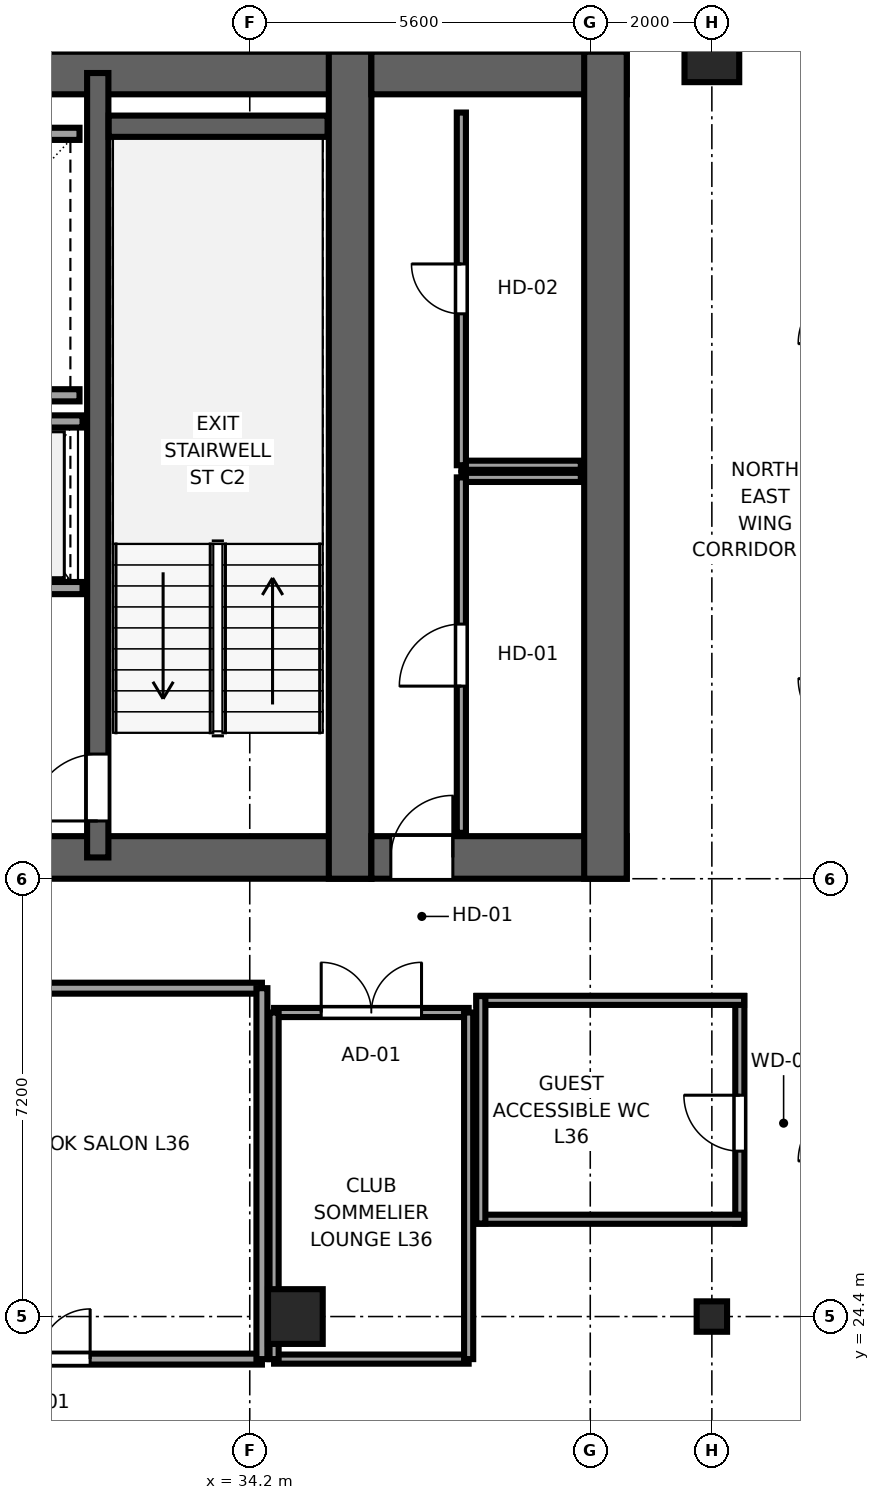
"""IFC4 building model, lengths in metres.
Left out: names, types, materials, properties, quantities, classifications, styles, units other than length and angle.
Written with IfcOpenShell. Run it as: python <this file> out.ifc"""

import sys

from ifc_helpers import new_model, si_unit, direction, frame, frame_2d, origin, origin_2d, place, context, subcontext, project, spatial, rectangle, i_section, extrude, source, transform, mapped, element, fill, save


model = new_model("IFC4")
c1 = context("Model", 3, precision=1e-05, world=origin(), true_north=direction((0.0, 1.0)))
c2 = subcontext(c1, "Body", "Model", "MODEL_VIEW")
j1 = project(units=[si_unit("LENGTHUNIT", "METRE"), si_unit("PLANEANGLEUNIT", "RADIAN")], contexts=[c1])
p1 = place(None, origin())
s1 = spatial("IfcSite", under=j1, at=p1, CompositionType="ELEMENT")
p2 = place(p1, origin())
s2 = spatial("IfcBuilding", under=s1, at=p2, CompositionType="ELEMENT")
p3 = place(p2, frame((0.0, 0.0, 139.95)))
s3 = spatial("IfcBuildingStorey", under=s2, at=p3, CompositionType="ELEMENT", Elevation=139.95)
p4 = place(p3, frame((9.8, 31.95, 0.0), z_axis=(0.0, 0.0, 1.0), x_axis=(1.0, 0.0, 0.0)))
e1 = element("IfcWall", 1, at=p4, inside=s3, PredefinedType="SHEAR", context=c2, shape_type="SweptSolid", body=[
    extrude(rectangle(XDim=26.4, YDim=0.7, at=frame_2d((13.2, 0.0))), origin(), (0.0, 0.0, 1.0), 3.55),
])
p5 = place(p4, frame((7.65, 0.0, 0.0), z_axis=(0.0, 0.0, 1.0), x_axis=(-1.0, 0.0, 0.0)))
e2 = element("IfcOpeningElement", 2, at=p5, cuts=e1, PredefinedType="OPENING", context=c2, shape_type="SweptSolid", body=[
    extrude(rectangle(XDim=1.5, YDim=2.04, at=frame_2d((0.75, 1.02))), frame((0.0, 0.36, 0.0), z_axis=(0.0, -1.0, 0.0), x_axis=(1.0, 0.0, 0.0)), (0.0, 0.0, 1.0), 0.72),
])
p6 = place(p4, frame((13.95, 0.0, 0.0), z_axis=(0.0, 0.0, 1.0), x_axis=(-1.0, 0.0, 0.0)))
e3 = element("IfcOpeningElement", 3, at=p6, cuts=e1, PredefinedType="OPENING", context=c2, shape_type="SweptSolid", body=[
    extrude(rectangle(XDim=1.5, YDim=2.04, at=frame_2d((0.75, 1.02))), frame((0.0, 0.36, 0.0), z_axis=(0.0, -1.0, 0.0), x_axis=(1.0, 0.0, 0.0)), (0.0, 0.0, 1.0), 0.72),
])
p7 = place(p4, frame((20.25, 0.0, 0.0), z_axis=(0.0, 0.0, 1.0), x_axis=(-1.0, 0.0, 0.0)))
e4 = element("IfcOpeningElement", 4, at=p7, cuts=e1, PredefinedType="OPENING", context=c2, shape_type="SweptSolid", body=[
    extrude(rectangle(XDim=1.5, YDim=2.04, at=frame_2d((0.75, 1.02))), frame((0.0, 0.36, 0.0), z_axis=(0.0, -1.0, 0.0), x_axis=(1.0, 0.0, 0.0)), (0.0, 0.0, 1.0), 0.72),
])
p8 = place(p3, frame((9.8, 44.85, 0.0), z_axis=(0.0, 0.0, 1.0), x_axis=(1.0, 0.0, 0.0)))
e5 = element("IfcWall", 5, at=p8, inside=s3, PredefinedType="SHEAR", context=c2, shape_type="SweptSolid", body=[
    extrude(rectangle(XDim=26.4, YDim=0.7, at=frame_2d((13.2, 0.0))), origin(), (0.0, 0.0, 1.0), 3.55),
])
p9 = place(p3, frame((35.85, 31.6, 0.0), z_axis=(0.0, 0.0, 1.0), x_axis=(0.0, 1.0, 0.0)))
e6 = element("IfcWall", 6, at=p9, inside=s3, PredefinedType="SHEAR", context=c2, shape_type="SweptSolid", body=[
    extrude(rectangle(XDim=13.6, YDim=0.7, at=frame_2d((6.8, 0.0))), origin(), (0.0, 0.0, 1.0), 3.55),
])
p10 = place(p3, frame((31.7, 31.95, 0.0), z_axis=(0.0, 0.0, 1.0), x_axis=(0.0, 1.0, 0.0)))
e7 = element("IfcWall", 7, at=p10, inside=s3, PredefinedType="SHEAR", context=c2, shape_type="SweptSolid", body=[
    extrude(rectangle(XDim=12.9, YDim=0.35, at=frame_2d((6.45, 0.0))), origin(), (0.0, 0.0, 1.0), 3.55),
])
p11 = place(p10, frame((1.7, 0.0, 0.0), z_axis=(0.0, 0.0, 1.0), x_axis=(-1.0, 0.0, 0.0)))
e8 = element("IfcOpeningElement", 8, at=p11, cuts=e7, PredefinedType="OPENING", context=c2, shape_type="SweptSolid", body=[
    extrude(rectangle(XDim=1.1, YDim=2.12, at=frame_2d((0.55, 1.06))), frame((0.0, 0.185, 0.0), z_axis=(0.0, -1.0, 0.0), x_axis=(1.0, 0.0, 0.0)), (0.0, 0.0, 1.0), 0.37),
])
p12 = place(p3, frame((36.2, 31.95, 0.0), z_axis=(0.0, 0.0, 1.0), x_axis=(1.0, 0.0, 0.0)))
e9 = element("IfcWall", 9, at=p12, inside=s3, PredefinedType="SHEAR", context=c2, shape_type="SweptSolid", body=[
    extrude(rectangle(XDim=4.2, YDim=0.7, at=frame_2d((2.1, 0.0))), origin(), (0.0, 0.0, 1.0), 3.55),
])
p13 = place(p12, frame((1.34, 0.0, 0.0), z_axis=(0.0, 0.0, 1.0), x_axis=(-1.0, 0.0, 0.0)))
e10 = element("IfcOpeningElement", 10, at=p13, cuts=e9, PredefinedType="OPENING", context=c2, shape_type="SweptSolid", body=[
    extrude(rectangle(XDim=1.02, YDim=2.03, at=frame_2d((0.51, 1.015))), frame((0.0, 0.36, 0.0), z_axis=(0.0, -1.0, 0.0), x_axis=(1.0, 0.0, 0.0)), (0.0, 0.0, 1.0), 0.72),
])
p14 = place(p3, frame((36.2, 44.85, 0.0), z_axis=(0.0, 0.0, 1.0), x_axis=(1.0, 0.0, 0.0)))
e11 = element("IfcWall", 11, at=p14, inside=s3, PredefinedType="SHEAR", context=c2, shape_type="SweptSolid", body=[
    extrude(rectangle(XDim=4.2, YDim=0.7, at=frame_2d((2.1, 0.0))), origin(), (0.0, 0.0, 1.0), 3.55),
])
p15 = place(p3, frame((40.05, 31.6, 0.0), z_axis=(0.0, 0.0, 1.0), x_axis=(0.0, 1.0, 0.0)))
e12 = element("IfcWall", 12, at=p15, inside=s3, PredefinedType="SHEAR", context=c2, shape_type="SweptSolid", body=[
    extrude(rectangle(XDim=13.6, YDim=0.7, at=frame_2d((6.8, 0.0))), origin(), (0.0, 0.0, 1.0), 3.55),
])
p16 = place(p3, frame((31.88, 43.975, 0.0), z_axis=(0.0, 0.0, 1.0), x_axis=(1.0, 0.0, 0.0)))
e13 = element("IfcWall", 13, at=p16, inside=s3, PredefinedType="SHEAR", context=c2, shape_type="SweptSolid", body=[
    extrude(rectangle(XDim=3.6, YDim=0.35, at=frame_2d((1.8, 0.0))), origin(), (0.0, 0.0, 1.0), 3.55),
])
m1 = source(origin(), c2, "Body", "SweptSolid", [
    extrude(rectangle(XDim=0.9, YDim=0.9, at=origin_2d()), origin(), (0.0, 0.0, 1.0), 3.55),
])
p17 = place(p3, frame((34.95, 24.4, 0.0), z_axis=(0.0, 0.0, 1.0), x_axis=(1.0, 0.0, 0.0)))
e14 = element("IfcColumn", 14, at=p17, inside=s3, PredefinedType="COLUMN", context=c2, shape_type="MappedRepresentation", body=[
    mapped(m1, transform((0.0, 0.0, 0.0), x_axis=(1.0, 0.0, 0.0), y_axis=(0.0, 1.0, 0.0), z_axis=(0.0, 0.0, 1.0), scale=1.0)),
])
m2 = source(origin(), c2, "Body", "SweptSolid", [
    extrude(i_section(OverallWidth=0.5, OverallDepth=0.5, WebThickness=0.022, FlangeThickness=0.034, at=origin_2d()), origin(), (0.0, 0.0, 1.0), 3.55),
])
p18 = place(p3, frame((41.8, 24.4, 0.0), z_axis=(0.0, 0.0, 1.0), x_axis=(1.0, 0.0, 0.0)))
e15 = element("IfcColumn", 15, at=p18, inside=s3, PredefinedType="COLUMN", context=c2, shape_type="MappedRepresentation", body=[
    mapped(m2, transform((0.0, 0.0, 0.0), x_axis=(1.0, 0.0, 0.0), y_axis=(0.0, 1.0, 0.0), z_axis=(0.0, 0.0, 1.0), scale=1.0)),
])
p19 = place(p3, frame((41.8, 45.15, 0.0), z_axis=(0.0, 0.0, 1.0), x_axis=(1.0, 0.0, 0.0)))
e16 = element("IfcColumn", 16, at=p19, inside=s3, PredefinedType="COLUMN", context=c2, shape_type="MappedRepresentation", body=[
    mapped(m1, transform((0.0, 0.0, 0.0), x_axis=(1.0, 0.0, 0.0), y_axis=(0.0, 1.0, 0.0), z_axis=(0.0, 0.0, 1.0), scale=1.0)),
])
for number, where, z_axis, x_axis in (
    (17, (27.3, 39.55, 0.0), (0.0, 0.0, 1.0), (1.0, 0.0, 0.0)),
    (18, (27.3, 43.85, 0.0), (0.0, 0.0, 1.0), (1.0, 0.0, 0.0)),
):
    element("IfcWall", number, at=place(p3, frame(where, z_axis=z_axis, x_axis=x_axis)), inside=s3, PredefinedType="SOLIDWALL", context=c2, shape_type="SweptSolid", body=[
        extrude(rectangle(XDim=4.1, YDim=0.2, at=frame_2d((2.05, 0.0))), origin(), (0.0, 0.0, 1.0), 3.37),
    ])
p20 = place(p3, frame((27.375, 36.38, 0.0), z_axis=(0.0, 0.0, 1.0), x_axis=(1.0, 0.0, 0.0)))
e19 = element("IfcWall", 19, at=p20, inside=s3, PredefinedType="SOLIDWALL", context=c2, shape_type="SweptSolid", body=[
    extrude(rectangle(XDim=4.075, YDim=0.2, at=frame_2d((2.038, 0.0))), origin(), (0.0, 0.0, 1.0), 3.37),
])
p21 = place(p20, frame((0.525, 0.0, 0.0)))
e20 = element("IfcOpeningElement", 20, at=p21, cuts=e19, PredefinedType="OPENING", context=c2, shape_type="SweptSolid", body=[
    extrude(rectangle(XDim=1.1, YDim=2.12, at=frame_2d((0.55, 1.06))), frame((0.0, 0.11, 0.0), z_axis=(0.0, -1.0, 0.0), x_axis=(1.0, 0.0, 0.0)), (0.0, 0.0, 1.0), 0.22),
])
p22 = place(p20, frame((2.425, 0.0, 0.0)))
e21 = element("IfcOpeningElement", 21, at=p22, cuts=e19, PredefinedType="OPENING", context=c2, shape_type="SweptSolid", body=[
    extrude(rectangle(XDim=1.1, YDim=2.12, at=frame_2d((0.55, 1.06))), frame((0.0, 0.11, 0.0), z_axis=(0.0, -1.0, 0.0), x_axis=(1.0, 0.0, 0.0)), (0.0, 0.0, 1.0), 0.22),
])
p23 = place(p3, frame((27.375, 39.12, 0.0), z_axis=(0.0, 0.0, 1.0), x_axis=(1.0, 0.0, 0.0)))
e22 = element("IfcWall", 22, at=p23, inside=s3, PredefinedType="SOLIDWALL", context=c2, shape_type="SweptSolid", body=[
    extrude(rectangle(XDim=4.075, YDim=0.2, at=frame_2d((2.038, 0.0))), origin(), (0.0, 0.0, 1.0), 3.37),
])
p24 = place(p3, frame((37.68, 38.2, 0.0), z_axis=(0.0, 0.0, 1.0), x_axis=(1.0, 0.0, 0.0)))
e23 = element("IfcWall", 23, at=p24, inside=s3, PredefinedType="PARTITIONING", context=c2, shape_type="SweptSolid", body=[
    extrude(rectangle(XDim=1.965, YDim=0.15, at=frame_2d((0.982, 0.0))), origin(), (0.0, 0.0, 1.0), 3.37),
])
p25 = place(p3, frame((37.68, 32.355, 0.0), z_axis=(0.0, 0.0, 1.0), x_axis=(0.0, 1.0, 0.0)))
e24 = element("IfcWall", 24, at=p25, inside=s3, PredefinedType="PARTITIONING", context=c2, shape_type="SweptSolid", body=[
    extrude(rectangle(XDim=5.845, YDim=0.15, at=frame_2d((2.922, 0.0))), origin(), (0.0, 0.0, 1.0), 3.37),
])
p26 = place(p25, frame((2.413, 0.0, 0.0)))
e25 = element("IfcOpeningElement", 25, at=p26, cuts=e24, PredefinedType="OPENING", context=c2, shape_type="SweptSolid", body=[
    extrude(rectangle(XDim=1.02, YDim=2.03, at=frame_2d((0.51, 1.015))), frame((0.0, 0.085, 0.0), z_axis=(0.0, -1.0, 0.0), x_axis=(1.0, 0.0, 0.0)), (0.0, 0.0, 1.0), 0.17),
])
p27 = place(p3, frame((37.68, 38.4, 0.0), z_axis=(0.0, 0.0, 1.0), x_axis=(1.0, 0.0, 0.0)))
e26 = element("IfcWall", 26, at=p27, inside=s3, PredefinedType="PARTITIONING", context=c2, shape_type="SweptSolid", body=[
    extrude(rectangle(XDim=1.965, YDim=0.15, at=frame_2d((0.982, 0.0))), origin(), (0.0, 0.0, 1.0), 3.37),
])
p28 = place(p3, frame((37.68, 38.4, 0.0), z_axis=(0.0, 0.0, 1.0), x_axis=(0.0, 1.0, 0.0)))
e27 = element("IfcWall", 27, at=p28, inside=s3, PredefinedType="PARTITIONING", context=c2, shape_type="SweptSolid", body=[
    extrude(rectangle(XDim=5.8, YDim=0.15, at=frame_2d((2.9, 0.0))), origin(), (0.0, 0.0, 1.0), 3.37),
])
p29 = place(p28, frame((2.49, 0.0, 0.0)))
e28 = element("IfcOpeningElement", 28, at=p29, cuts=e27, PredefinedType="OPENING", context=c2, shape_type="SweptSolid", body=[
    extrude(rectangle(XDim=0.82, YDim=2.01, at=frame_2d((0.41, 1.005))), frame((0.0, 0.085, 0.0), z_axis=(0.0, -1.0, 0.0), x_axis=(1.0, 0.0, 0.0)), (0.0, 0.0, 1.0), 0.17),
])
p30 = place(p3, frame((42.26, 25.93, 0.0), z_axis=(0.0, 0.0, 1.0), x_axis=(0.0, 1.0, 0.0)))
e29 = element("IfcWall", 29, at=p30, inside=s3, PredefinedType="PARTITIONING", context=c2, shape_type="SweptSolid", body=[
    extrude(rectangle(XDim=3.74, YDim=0.15, at=frame_2d((1.87, 0.0))), origin(), (0.0, 0.0, 1.0), 3.37),
])
p31 = place(p30, frame((1.19, 0.0, 0.0)))
e30 = element("IfcOpeningElement", 30, at=p31, cuts=e29, PredefinedType="OPENING", context=c2, shape_type="SweptSolid", body=[
    extrude(rectangle(XDim=0.92, YDim=2.01, at=frame_2d((0.46, 1.005))), frame((0.0, 0.085, 0.0), z_axis=(0.0, -1.0, 0.0), x_axis=(1.0, 0.0, 0.0)), (0.0, 0.0, 1.0), 0.17),
])
for number, where, z_axis, x_axis in (
    (31, (37.93, 26.0, 0.0), (0.0, 0.0, 1.0), (1.0, 0.0, 0.0)),
    (32, (37.93, 29.6, 0.0), (0.0, 0.0, 1.0), (1.0, 0.0, 0.0)),
):
    element("IfcWall", number, at=place(p3, frame(where, z_axis=z_axis, x_axis=x_axis)), inside=s3, PredefinedType="PARTITIONING", context=c2, shape_type="SweptSolid", body=[
        extrude(rectangle(XDim=4.4, YDim=0.15, at=frame_2d((2.2, 0.0))), origin(), (0.0, 0.0, 1.0), 3.37),
    ])
p32 = place(p3, frame((38.0, 25.93, 0.0), z_axis=(0.0, 0.0, 1.0), x_axis=(0.0, 1.0, 0.0)))
e33 = element("IfcWall", 33, at=p32, inside=s3, PredefinedType="PARTITIONING", context=c2, shape_type="SweptSolid", body=[
    extrude(rectangle(XDim=3.74, YDim=0.15, at=frame_2d((1.87, 0.0))), origin(), (0.0, 0.0, 1.0), 3.37),
])
p33 = place(p3, frame((27.1, 23.7, 0.0), z_axis=(0.0, 0.0, 1.0), x_axis=(1.0, 0.0, 0.0)))
e34 = element("IfcWall", 34, at=p33, inside=s3, PredefinedType="PARTITIONING", context=c2, shape_type="SweptSolid", body=[
    extrude(rectangle(XDim=7.3, YDim=0.18, at=frame_2d((3.65, 0.0))), origin(), (0.0, 0.0, 1.0), 3.37),
])
p34 = place(p33, frame((2.825, 0.0, 0.0)))
e35 = element("IfcOpeningElement", 35, at=p34, cuts=e34, PredefinedType="OPENING", context=c2, shape_type="SweptSolid", body=[
    extrude(rectangle(XDim=1.65, YDim=2.15, at=frame_2d((0.825, 1.075))), frame((0.0, 0.1, 0.0), z_axis=(0.0, -1.0, 0.0), x_axis=(1.0, 0.0, 0.0)), (0.0, 0.0, 1.0), 0.2),
])
p35 = place(p3, frame((27.1, 29.8, 0.0), z_axis=(0.0, 0.0, 1.0), x_axis=(1.0, 0.0, 0.0)))
e36 = element("IfcWall", 36, at=p35, inside=s3, PredefinedType="PARTITIONING", context=c2, shape_type="SweptSolid", body=[
    extrude(rectangle(XDim=7.3, YDim=0.18, at=frame_2d((3.65, 0.0))), origin(), (0.0, 0.0, 1.0), 3.37),
])
p36 = place(p3, frame((34.4, 23.7, 0.0), z_axis=(0.0, 0.0, 1.0), x_axis=(0.0, 1.0, 0.0)))
e37 = element("IfcWall", 37, at=p36, inside=s3, PredefinedType="PARTITIONING", context=c2, shape_type="SweptSolid", body=[
    extrude(rectangle(XDim=6.1, YDim=0.18, at=frame_2d((3.05, 0.0))), origin(), (0.0, 0.0, 1.0), 3.37),
])
p37 = place(p3, frame((34.6, 23.7, 0.0), z_axis=(0.0, 0.0, 1.0), x_axis=(1.0, 0.0, 0.0)))
e38 = element("IfcWall", 38, at=p37, inside=s3, PredefinedType="PARTITIONING", context=c2, shape_type="SweptSolid", body=[
    extrude(rectangle(XDim=3.2, YDim=0.15, at=frame_2d((1.6, 0.0))), origin(), (0.0, 0.0, 1.0), 3.37),
])
p38 = place(p3, frame((34.6, 29.4, 0.0), z_axis=(0.0, 0.0, 1.0), x_axis=(1.0, 0.0, 0.0)))
e39 = element("IfcWall", 39, at=p38, inside=s3, PredefinedType="PARTITIONING", context=c2, shape_type="SweptSolid", body=[
    extrude(rectangle(XDim=3.2, YDim=0.15, at=frame_2d((1.6, 0.0))), origin(), (0.0, 0.0, 1.0), 3.37),
])
p39 = place(p38, frame((0.775, 0.0, 0.0)))
e40 = element("IfcOpeningElement", 40, at=p39, cuts=e39, PredefinedType="OPENING", context=c2, shape_type="SweptSolid", body=[
    extrude(rectangle(XDim=1.65, YDim=2.15, at=frame_2d((0.825, 1.075))), frame((0.0, 0.085, 0.0), z_axis=(0.0, -1.0, 0.0), x_axis=(1.0, 0.0, 0.0)), (0.0, 0.0, 1.0), 0.17),
])
for number, where, z_axis, x_axis in (
    (41, (34.6, 23.7, 0.0), (0.0, 0.0, 1.0), (0.0, 1.0, 0.0)),
    (42, (37.8, 23.7, 0.0), (0.0, 0.0, 1.0), (0.0, 1.0, 0.0)),
):
    element("IfcWall", number, at=place(p3, frame(where, z_axis=z_axis, x_axis=x_axis)), inside=s3, PredefinedType="PARTITIONING", context=c2, shape_type="SweptSolid", body=[
        extrude(rectangle(XDim=5.7, YDim=0.15, at=frame_2d((2.85, 0.0))), origin(), (0.0, 0.0, 1.0), 3.37),
    ])
m3 = source(origin(), c2, "Body", "SweptSolid", [
    extrude(rectangle(XDim=1.1, YDim=2.12, at=frame_2d((0.55, 1.06))), frame((0.0, 0.025, 0.0), z_axis=(0.0, -1.0, 0.0), x_axis=(1.0, 0.0, 0.0)), (0.0, 0.0, 1.0), 0.05),
])
p40 = place(p11, origin())
e43 = element("IfcDoor", 43, at=p40, inside=s3, OperationType="SINGLE_SWING_LEFT", PredefinedType="DOOR", context=c2, shape_type="MappedRepresentation", body=[
    mapped(m3, transform((0.0, 0.0, 0.0), x_axis=(1.0, 0.0, 0.0), y_axis=(0.0, 1.0, 0.0), z_axis=(0.0, 0.0, 1.0), scale=1.0)),
])
fill(e8, e43)
m4 = source(origin(), c2, "Body", "SweptSolid", [
    extrude(rectangle(XDim=1.02, YDim=2.03, at=frame_2d((0.51, 1.015))), frame((0.0, 0.025, 0.0), z_axis=(0.0, -1.0, 0.0), x_axis=(1.0, 0.0, 0.0)), (0.0, 0.0, 1.0), 0.05),
])
p41 = place(p13, origin())
e44 = element("IfcDoor", 44, at=p41, inside=s3, OperationType="SINGLE_SWING_RIGHT", PredefinedType="DOOR", context=c2, shape_type="MappedRepresentation", body=[
    mapped(m4, transform((0.0, 0.0, 0.0), x_axis=(1.0, 0.0, 0.0), y_axis=(0.0, 1.0, 0.0), z_axis=(0.0, 0.0, 1.0), scale=1.0)),
])
fill(e10, e44)
p42 = place(p26, origin())
e45 = element("IfcDoor", 45, at=p42, inside=s3, OperationType="SINGLE_SWING_LEFT", PredefinedType="DOOR", context=c2, shape_type="MappedRepresentation", body=[
    mapped(m4, transform((0.0, 0.0, 0.0), x_axis=(1.0, 0.0, 0.0), y_axis=(0.0, 1.0, 0.0), z_axis=(0.0, 0.0, 1.0), scale=1.0)),
])
fill(e25, e45)
m5 = source(origin(), c2, "Body", "SweptSolid", [
    extrude(rectangle(XDim=0.82, YDim=2.01, at=frame_2d((0.41, 1.005))), frame((0.0, 0.025, 0.0), z_axis=(0.0, -1.0, 0.0), x_axis=(1.0, 0.0, 0.0)), (0.0, 0.0, 1.0), 0.05),
])
p43 = place(p29, origin())
e46 = element("IfcDoor", 46, at=p43, inside=s3, OperationType="SINGLE_SWING_RIGHT", PredefinedType="DOOR", context=c2, shape_type="MappedRepresentation", body=[
    mapped(m5, transform((0.0, 0.0, 0.0), x_axis=(1.0, 0.0, 0.0), y_axis=(0.0, 1.0, 0.0), z_axis=(0.0, 0.0, 1.0), scale=1.0)),
])
fill(e28, e46)
m6 = source(origin(), c2, "Body", "SweptSolid", [
    extrude(rectangle(XDim=0.92, YDim=2.01, at=frame_2d((0.46, 1.005))), frame((0.0, 0.025, 0.0), z_axis=(0.0, -1.0, 0.0), x_axis=(1.0, 0.0, 0.0)), (0.0, 0.0, 1.0), 0.05),
])
p44 = place(p31, origin())
e47 = element("IfcDoor", 47, at=p44, inside=s3, OperationType="SINGLE_SWING_RIGHT", PredefinedType="DOOR", context=c2, shape_type="MappedRepresentation", body=[
    mapped(m6, transform((0.0, 0.0, 0.0), x_axis=(1.0, 0.0, 0.0), y_axis=(0.0, 1.0, 0.0), z_axis=(0.0, 0.0, 1.0), scale=1.0)),
])
fill(e30, e47)
m7 = source(origin(), c2, "Body", "SweptSolid", [
    extrude(rectangle(XDim=1.65, YDim=2.15, at=frame_2d((0.825, 1.075))), frame((0.0, 0.025, 0.0), z_axis=(0.0, -1.0, 0.0), x_axis=(1.0, 0.0, 0.0)), (0.0, 0.0, 1.0), 0.05),
])
p45 = place(p34, origin())
e48 = element("IfcDoor", 48, at=p45, inside=s3, OperationType="DOUBLE_DOOR_SINGLE_SWING", PredefinedType="DOOR", context=c2, shape_type="MappedRepresentation", body=[
    mapped(m7, transform((0.0, 0.0, 0.0), x_axis=(1.0, 0.0, 0.0), y_axis=(0.0, 1.0, 0.0), z_axis=(0.0, 0.0, 1.0), scale=1.0)),
])
fill(e35, e48)
p46 = place(p39, origin())
e49 = element("IfcDoor", 49, at=p46, inside=s3, OperationType="DOUBLE_DOOR_SINGLE_SWING", PredefinedType="DOOR", context=c2, shape_type="MappedRepresentation", body=[
    mapped(m7, transform((0.0, 0.0, 0.0), x_axis=(1.0, 0.0, 0.0), y_axis=(0.0, 1.0, 0.0), z_axis=(0.0, 0.0, 1.0), scale=1.0)),
])
fill(e40, e49)
save(model, sys.argv[1])
